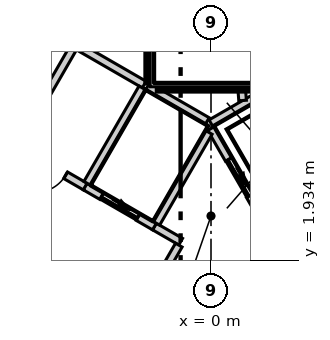
"""IFC4 building model, lengths in metres.
Left out: names, types, materials, properties, quantities, classifications, styles, units other than length and angle.
Written with IfcOpenShell. Run it as: python <this file> out.ifc"""

import sys

from ifc_helpers import new_model, si_unit, direction, frame, frame_2d, origin, place, context, subcontext, project, spatial, polyline, rectangle, outline, extrude, element, fill, save


model = new_model("IFC4")
c1 = context("Model", 3, precision=1e-05, world=origin(), true_north=direction((0.0, 1.0)))
c2 = subcontext(c1, "Body", "Model", "MODEL_VIEW")
j1 = project(units=[si_unit("LENGTHUNIT", "METRE"), si_unit("PLANEANGLEUNIT", "RADIAN")], contexts=[c1])
p1 = place(None, origin())
s1 = spatial("IfcSite", under=j1, at=p1, CompositionType="ELEMENT")
p2 = place(p1, origin())
s2 = spatial("IfcBuilding", under=s1, at=p2, CompositionType="ELEMENT")
p3 = place(p2, frame((0.0, 0.0, 35.3)))
s3 = spatial("IfcBuildingStorey", under=s2, at=p3, CompositionType="ELEMENT", Elevation=35.3)
p4 = place(p3, frame((-1.645, 15.25, -0.3), z_axis=(0.0, 0.0, 1.0), x_axis=(-0.500026485275, -0.866010111964, 0.0)))
e1 = element("IfcWall", 1, at=p4, inside=s3, PredefinedType="SHEAR", context=c2, shape_type="SweptSolid", body=[
    extrude(outline(polyline([(-0.26, -0.45), (1.685, -0.45), (3.63, -0.45), (5.576, -0.45), (7.521, -0.45), (9.466, -0.449), (11.411, -0.449), (13.357, -0.449), (15.302, -0.449), (17.247, -0.449), (19.192, -0.449), (21.138, -0.449), (23.083, -0.449), (25.028, -0.449), (24.509, 0.45), (22.644, 0.45), (20.778, 0.45), (18.913, 0.45), (17.048, 0.45), (15.182, 0.449), (13.317, 0.449), (11.452, 0.449), (9.587, 0.449), (7.721, 0.449), (5.856, 0.449), (3.991, 0.449), (2.125, 0.449), (0.26, 0.449), (-0.26, -0.45)])), origin(), (0.0, 0.0, 1.0), 4.0),
])
p5 = place(p4, frame((11.834, 0.0, 0.3)))
e2 = element("IfcOpeningElement", 2, at=p5, cuts=e1, PredefinedType="OPENING", context=c2, shape_type="SweptSolid", body=[
    extrude(rectangle(XDim=1.1, YDim=2.1, at=frame_2d((0.55, 1.05))), frame((0.0, 0.46, 0.0), z_axis=(0.0, -1.0, 0.0), x_axis=(1.0, 0.0, 0.0)), (0.0, 0.0, 1.0), 0.92),
])
p6 = place(p4, frame((4.842, 0.0, 0.3)))
e3 = element("IfcOpeningElement", 3, at=p6, cuts=e1, PredefinedType="OPENING", context=c2, shape_type="SweptSolid", body=[
    extrude(rectangle(XDim=1.0, YDim=2.1, at=frame_2d((0.5, 1.05))), frame((0.0, 0.46, 0.0), z_axis=(0.0, -1.0, 0.0), x_axis=(1.0, 0.0, 0.0)), (0.0, 0.0, 1.0), 0.92),
])
p7 = place(p3, frame((-3.462, 38.603, 0.0), z_axis=(0.0, 0.0, 1.0), x_axis=(-0.500012207976, -0.866018355391, 0.0)))
e4 = element("IfcWall", 4, at=p7, inside=s3, PredefinedType="ELEMENTEDWALL", context=c2, shape_type="SweptSolid", body=[
    extrude(rectangle(XDim=63.381, YDim=0.2, at=frame_2d((31.69, 0.0))), origin(), (0.0, 0.0, 1.0), 3.7),
])
p8 = place(p7, frame((2.302, 0.0, 0.9)))
e5 = element("IfcOpeningElement", 5, at=p8, cuts=e4, PredefinedType="OPENING", context=c2, shape_type="SweptSolid", body=[
    extrude(rectangle(XDim=5.6, YDim=2.5, at=frame_2d((2.8, 1.25))), frame((0.0, 0.11, 0.0), z_axis=(0.0, -1.0, 0.0), x_axis=(1.0, 0.0, 0.0)), (0.0, 0.0, 1.0), 0.22),
])
p9 = place(p7, frame((9.902, 0.0, 0.9)))
e6 = element("IfcOpeningElement", 6, at=p9, cuts=e4, PredefinedType="OPENING", context=c2, shape_type="SweptSolid", body=[
    extrude(rectangle(XDim=5.6, YDim=2.5, at=frame_2d((2.8, 1.25))), frame((0.0, 0.11, 0.0), z_axis=(0.0, -1.0, 0.0), x_axis=(1.0, 0.0, 0.0)), (0.0, 0.0, 1.0), 0.22),
])
p10 = place(p7, frame((17.501, 0.0, 0.9)))
e7 = element("IfcOpeningElement", 7, at=p10, cuts=e4, PredefinedType="OPENING", context=c2, shape_type="SweptSolid", body=[
    extrude(rectangle(XDim=5.6, YDim=2.5, at=frame_2d((2.8, 1.25))), frame((0.0, 0.11, 0.0), z_axis=(0.0, -1.0, 0.0), x_axis=(1.0, 0.0, 0.0)), (0.0, 0.0, 1.0), 0.22),
])
p11 = place(p7, frame((25.1, 0.0, 0.9)))
e8 = element("IfcOpeningElement", 8, at=p11, cuts=e4, PredefinedType="OPENING", context=c2, shape_type="SweptSolid", body=[
    extrude(rectangle(XDim=5.6, YDim=2.5, at=frame_2d((2.8, 1.25))), frame((0.0, 0.11, 0.0), z_axis=(0.0, -1.0, 0.0), x_axis=(1.0, 0.0, 0.0)), (0.0, 0.0, 1.0), 0.22),
])
p12 = place(p7, frame((32.7, 0.0, 0.9)))
e9 = element("IfcOpeningElement", 9, at=p12, cuts=e4, PredefinedType="OPENING", context=c2, shape_type="SweptSolid", body=[
    extrude(rectangle(XDim=5.6, YDim=2.5, at=frame_2d((2.8, 1.25))), frame((0.0, 0.11, 0.0), z_axis=(0.0, -1.0, 0.0), x_axis=(1.0, 0.0, 0.0)), (0.0, 0.0, 1.0), 0.22),
])
p13 = place(p7, frame((40.299, 0.0, 0.9)))
e10 = element("IfcOpeningElement", 10, at=p13, cuts=e4, PredefinedType="OPENING", context=c2, shape_type="SweptSolid", body=[
    extrude(rectangle(XDim=5.6, YDim=2.5, at=frame_2d((2.8, 1.25))), frame((0.0, 0.11, 0.0), z_axis=(0.0, -1.0, 0.0), x_axis=(1.0, 0.0, 0.0)), (0.0, 0.0, 1.0), 0.22),
])
p14 = place(p7, frame((47.899, 0.0, 0.9)))
e11 = element("IfcOpeningElement", 11, at=p14, cuts=e4, PredefinedType="OPENING", context=c2, shape_type="SweptSolid", body=[
    extrude(rectangle(XDim=5.6, YDim=2.5, at=frame_2d((2.8, 1.25))), frame((0.0, 0.11, 0.0), z_axis=(0.0, -1.0, 0.0), x_axis=(1.0, 0.0, 0.0)), (0.0, 0.0, 1.0), 0.22),
])
p15 = place(p7, frame((55.498, 0.0, 0.9)))
e12 = element("IfcOpeningElement", 12, at=p15, cuts=e4, PredefinedType="OPENING", context=c2, shape_type="SweptSolid", body=[
    extrude(rectangle(XDim=5.6, YDim=2.5, at=frame_2d((2.8, 1.25))), frame((0.0, 0.11, 0.0), z_axis=(0.0, -1.0, 0.0), x_axis=(1.0, 0.0, 0.0)), (0.0, 0.0, 1.0), 0.22),
])
p16 = place(p3, frame((-19.497, -11.17, 0.0), z_axis=(0.0, 0.0, 1.0), x_axis=(0.499998854553, 0.866026065108, 0.0)))
e13 = element("IfcWall", 13, at=p16, inside=s3, PredefinedType="PARTITIONING", context=c2, shape_type="SweptSolid", body=[
    extrude(rectangle(XDim=38.994, YDim=0.15, at=frame_2d((19.497, 0.0))), origin(), (0.0, 0.0, 1.0), 3.7),
])
p17 = place(p16, frame((36.244, 0.0, 0.0)))
e14 = element("IfcOpeningElement", 14, at=p17, cuts=e13, PredefinedType="OPENING", context=c2, shape_type="SweptSolid", body=[
    extrude(rectangle(XDim=1.1, YDim=2.1, at=frame_2d((0.55, 1.05))), frame((0.0, 0.085, 0.0), z_axis=(0.0, -1.0, 0.0), x_axis=(1.0, 0.0, 0.0)), (0.0, 0.0, 1.0), 0.17),
])
p18 = place(p16, frame((29.171, 0.0, 0.0)))
e15 = element("IfcOpeningElement", 15, at=p18, cuts=e13, PredefinedType="OPENING", context=c2, shape_type="SweptSolid", body=[
    extrude(rectangle(XDim=1.0, YDim=2.1, at=frame_2d((0.5, 1.05))), frame((0.0, 0.085, 0.0), z_axis=(0.0, -1.0, 0.0), x_axis=(1.0, 0.0, 0.0)), (0.0, 0.0, 1.0), 0.17),
])
p19 = place(p16, frame((32.971, 0.0, 0.0)))
e16 = element("IfcOpeningElement", 16, at=p19, cuts=e13, PredefinedType="OPENING", context=c2, shape_type="SweptSolid", body=[
    extrude(rectangle(XDim=0.9, YDim=2.1, at=frame_2d((0.45, 1.05))), frame((0.0, 0.085, 0.0), z_axis=(0.0, -1.0, 0.0), x_axis=(1.0, 0.0, 0.0)), (0.0, 0.0, 1.0), 0.17),
])
p20 = place(p16, frame((22.771, 0.0, 0.0)))
e17 = element("IfcOpeningElement", 17, at=p20, cuts=e13, PredefinedType="OPENING", context=c2, shape_type="SweptSolid", body=[
    extrude(rectangle(XDim=1.0, YDim=2.1, at=frame_2d((0.5, 1.05))), frame((0.0, 0.085, 0.0), z_axis=(0.0, -1.0, 0.0), x_axis=(1.0, 0.0, 0.0)), (0.0, 0.0, 1.0), 0.17),
])
p21 = place(p16, frame((6.872, 0.0, 0.0)))
e18 = element("IfcOpeningElement", 18, at=p21, cuts=e13, PredefinedType="OPENING", context=c2, shape_type="SweptSolid", body=[
    extrude(rectangle(XDim=1.1, YDim=2.1, at=frame_2d((0.55, 1.05))), frame((0.0, 0.085, 0.0), z_axis=(0.0, -1.0, 0.0), x_axis=(1.0, 0.0, 0.0)), (0.0, 0.0, 1.0), 0.17),
])
p22 = place(p16, frame((17.372, 0.0, 0.0)))
e19 = element("IfcOpeningElement", 19, at=p22, cuts=e13, PredefinedType="OPENING", context=c2, shape_type="SweptSolid", body=[
    extrude(rectangle(XDim=0.9, YDim=2.1, at=frame_2d((0.45, 1.05))), frame((0.0, 0.085, 0.0), z_axis=(0.0, -1.0, 0.0), x_axis=(1.0, 0.0, 0.0)), (0.0, 0.0, 1.0), 0.17),
])
p23 = place(p16, frame((14.172, 0.0, 0.0)))
e20 = element("IfcOpeningElement", 20, at=p23, cuts=e13, PredefinedType="OPENING", context=c2, shape_type="SweptSolid", body=[
    extrude(rectangle(XDim=0.9, YDim=2.1, at=frame_2d((0.45, 1.05))), frame((0.0, 0.085, 0.0), z_axis=(0.0, -1.0, 0.0), x_axis=(1.0, 0.0, 0.0)), (0.0, 0.0, 1.0), 0.17),
])
p24 = place(p16, frame((11.272, 0.0, 0.0)))
e21 = element("IfcOpeningElement", 21, at=p24, cuts=e13, PredefinedType="OPENING", context=c2, shape_type="SweptSolid", body=[
    extrude(rectangle(XDim=1.0, YDim=2.1, at=frame_2d((0.5, 1.05))), frame((0.0, 0.085, 0.0), z_axis=(0.0, -1.0, 0.0), x_axis=(1.0, 0.0, 0.0)), (0.0, 0.0, 1.0), 0.17),
])
p25 = place(p16, frame((1.473, 0.0, 0.0)))
e22 = element("IfcOpeningElement", 22, at=p25, cuts=e13, PredefinedType="OPENING", context=c2, shape_type="SweptSolid", body=[
    extrude(rectangle(XDim=1.1, YDim=2.1, at=frame_2d((0.55, 1.05))), frame((0.0, 0.085, 0.0), z_axis=(0.0, -1.0, 0.0), x_axis=(1.0, 0.0, 0.0)), (0.0, 0.0, 1.0), 0.17),
])
p26 = place(p3, frame((0.075, 22.47, 0.0), z_axis=(0.0, 0.0, 1.0), x_axis=(0.500002280369, -0.866024087209, 0.0)))
e23 = element("IfcWall", 23, at=p26, inside=s3, PredefinedType="PARTITIONING", context=c2, shape_type="SweptSolid", body=[
    extrude(rectangle(XDim=38.844, YDim=0.15, at=frame_2d((19.422, 0.0))), origin(), (0.0, 0.0, 1.0), 3.7),
])
p27 = place(p26, frame((36.244, 0.0, 0.0)))
e24 = element("IfcOpeningElement", 24, at=p27, cuts=e23, PredefinedType="OPENING", context=c2, shape_type="SweptSolid", body=[
    extrude(rectangle(XDim=1.1, YDim=2.1, at=frame_2d((0.55, 1.05))), frame((0.0, 0.085, 0.0), z_axis=(0.0, -1.0, 0.0), x_axis=(1.0, 0.0, 0.0)), (0.0, 0.0, 1.0), 0.17),
])
p28 = place(p26, frame((26.472, 0.0, 0.0)))
e25 = element("IfcOpeningElement", 25, at=p28, cuts=e23, PredefinedType="OPENING", context=c2, shape_type="SweptSolid", body=[
    extrude(rectangle(XDim=1.1, YDim=2.1, at=frame_2d((0.55, 1.05))), frame((0.0, 0.085, 0.0), z_axis=(0.0, -1.0, 0.0), x_axis=(1.0, 0.0, 0.0)), (0.0, 0.0, 1.0), 0.17),
])
p29 = place(p26, frame((8.872, 0.0, 0.0)))
e26 = element("IfcOpeningElement", 26, at=p29, cuts=e23, PredefinedType="OPENING", context=c2, shape_type="SweptSolid", body=[
    extrude(rectangle(XDim=1.1, YDim=2.1, at=frame_2d((0.55, 1.05))), frame((0.0, 0.085, 0.0), z_axis=(0.0, -1.0, 0.0), x_axis=(1.0, 0.0, 0.0)), (0.0, 0.0, 1.0), 0.17),
])
p30 = place(p26, frame((17.672, 0.0, 0.0)))
e27 = element("IfcOpeningElement", 27, at=p30, cuts=e23, PredefinedType="OPENING", context=c2, shape_type="SweptSolid", body=[
    extrude(rectangle(XDim=0.9, YDim=2.1, at=frame_2d((0.45, 1.05))), frame((0.0, 0.085, 0.0), z_axis=(0.0, -1.0, 0.0), x_axis=(1.0, 0.0, 0.0)), (0.0, 0.0, 1.0), 0.17),
])
p31 = place(p26, frame((15.272, 0.0, 0.0)))
e28 = element("IfcOpeningElement", 28, at=p31, cuts=e23, PredefinedType="OPENING", context=c2, shape_type="SweptSolid", body=[
    extrude(rectangle(XDim=0.9, YDim=2.1, at=frame_2d((0.45, 1.05))), frame((0.0, 0.085, 0.0), z_axis=(0.0, -1.0, 0.0), x_axis=(1.0, 0.0, 0.0)), (0.0, 0.0, 1.0), 0.17),
])
p32 = place(p26, frame((1.473, 0.0, 0.0)))
e29 = element("IfcOpeningElement", 29, at=p32, cuts=e23, PredefinedType="OPENING", context=c2, shape_type="SweptSolid", body=[
    extrude(rectangle(XDim=1.1, YDim=2.1, at=frame_2d((0.55, 1.05))), frame((0.0, 0.085, 0.0), z_axis=(0.0, -1.0, 0.0), x_axis=(1.0, 0.0, 0.0)), (0.0, 0.0, 1.0), 0.17),
])
p33 = place(p3, frame((-0.002, 5.541, 0.0), z_axis=(0.0, 0.0, 1.0), x_axis=(0.86600155993, 0.500041296494, 0.0)))
e30 = element("IfcWall", 30, at=p33, inside=s3, PredefinedType="SOLIDWALL", context=c2, shape_type="SweptSolid", body=[
    extrude(rectangle(XDim=4.132, YDim=0.2, at=frame_2d((2.066, 0.0))), origin(), (0.0, 0.0, 1.0), 3.7),
])
p34 = place(p3, frame((0.0, 5.4, 0.0), z_axis=(0.0, 0.0, 1.0), x_axis=(0.500103862429, -0.865965430478, 0.0)))
e31 = element("IfcWall", 31, at=p34, inside=s3, PredefinedType="SOLIDWALL", context=c2, shape_type="SweptSolid", body=[
    extrude(rectangle(XDim=2.973, YDim=0.2, at=frame_2d((1.487, 0.0))), origin(), (0.0, 0.0, 1.0), 3.7),
])
p35 = place(p34, frame((0.937, 0.0, 0.0)))
e32 = element("IfcOpeningElement", 32, at=p35, cuts=e31, PredefinedType="OPENING", context=c2, shape_type="SweptSolid", body=[
    extrude(rectangle(XDim=1.1, YDim=2.1, at=frame_2d((0.55, 1.05))), frame((0.0, 0.11, 0.0), z_axis=(0.0, -1.0, 0.0), x_axis=(1.0, 0.0, 0.0)), (0.0, 0.0, 1.0), 0.22),
])
p36 = place(p3, frame((-6.97, 5.987, 0.0), z_axis=(0.0, 0.0, 1.0), x_axis=(0.866029956157, -0.499992114976, 0.0)))
e33 = element("IfcWall", 33, at=p36, inside=s3, PredefinedType="SOLIDWALL", context=c2, shape_type="SweptSolid", body=[
    extrude(rectangle(XDim=4.232, YDim=0.2, at=frame_2d((2.116, 0.0))), origin(), (0.0, 0.0, 1.0), 3.7),
])
p37 = place(p36, frame((2.73, 0.0, 0.0)))
e34 = element("IfcOpeningElement", 34, at=p37, cuts=e33, PredefinedType="OPENING", context=c2, shape_type="SweptSolid", body=[
    extrude(rectangle(XDim=0.9, YDim=2.1, at=frame_2d((0.45, 1.05))), frame((0.0, 0.11, 0.0), z_axis=(0.0, -1.0, 0.0), x_axis=(1.0, 0.0, 0.0)), (0.0, 0.0, 1.0), 0.22),
])
p38 = place(p3, frame((-1.488, 2.822, 0.0), z_axis=(0.0, 0.0, 1.0), x_axis=(0.866236612152, -0.499633997809, 0.0)))
e35 = element("IfcWall", 35, at=p38, inside=s3, PredefinedType="SOLIDWALL", context=c2, shape_type="SweptSolid", body=[
    extrude(rectangle(XDim=0.796, YDim=0.2, at=frame_2d((0.398, 0.0))), origin(), (0.0, 0.0, 1.0), 3.7),
])
p39 = place(p3, frame((-5.076, 5.009, 0.0), z_axis=(0.0, 0.0, 1.0), x_axis=(0.50002537861, 0.866010750942, 0.0)))
e36 = element("IfcWall", 36, at=p39, inside=s3, PredefinedType="SOLIDWALL", context=c2, shape_type="SweptSolid", body=[
    extrude(rectangle(XDim=3.0, YDim=0.2, at=frame_2d((1.5, 0.0))), origin(), (0.0, 0.0, 1.0), 3.7),
])
p40 = place(p3, frame((-3.489, 7.557, 0.0), z_axis=(0.0, 0.0, 1.0), x_axis=(0.866010750942, -0.50002537861, 0.0)))
e37 = element("IfcWall", 37, at=p40, inside=s3, PredefinedType="SOLIDWALL", context=c2, shape_type="SweptSolid", body=[
    extrude(rectangle(XDim=2.0, YDim=0.2, at=frame_2d((1.0, 0.0))), origin(), (0.0, 0.0, 1.0), 3.7),
])
p41 = place(p3, frame((-2.444, -0.433, 0.0), z_axis=(0.0, 0.0, 1.0), x_axis=(0.500035624827, 0.866004834804, 0.0)))
e38 = element("IfcWall", 38, at=p41, inside=s3, PredefinedType="SOLIDWALL", context=c2, shape_type="SweptSolid", body=[
    extrude(rectangle(XDim=3.194, YDim=0.2, at=frame_2d((1.597, 0.0))), origin(), (0.0, 0.0, 1.0), 3.7),
])
p42 = place(p3, frame((-3.309, 3.873, 0.0), z_axis=(0.0, 0.0, 1.0), x_axis=(0.866098583652, -0.499873227325, 0.0)))
e39 = element("IfcWall", 39, at=p42, inside=s3, PredefinedType="SOLIDWALL", context=c2, shape_type="SweptSolid", body=[
    extrude(rectangle(XDim=2.103, YDim=0.2, at=frame_2d((1.051, 0.0))), origin(), (0.0, 0.0, 1.0), 3.7),
])
p43 = place(p42, frame((0.502, 0.0, 0.0)))
e40 = element("IfcOpeningElement", 40, at=p43, cuts=e39, PredefinedType="OPENING", context=c2, shape_type="SweptSolid", body=[
    extrude(rectangle(XDim=1.1, YDim=2.1, at=frame_2d((0.55, 1.05))), frame((0.0, 0.11, 0.0), z_axis=(0.0, -1.0, 0.0), x_axis=(1.0, 0.0, 0.0)), (0.0, 0.0, 1.0), 0.22),
])
p44 = place(p3, frame((-3.257, 3.959, 0.0), z_axis=(0.0, 0.0, 1.0), x_axis=(0.50012328804, 0.865954211699, 0.0)))
e41 = element("IfcWall", 41, at=p44, inside=s3, PredefinedType="SOLIDWALL", context=c2, shape_type="SweptSolid", body=[
    extrude(rectangle(XDim=2.9, YDim=0.2, at=frame_2d((1.45, 0.0))), origin(), (0.0, 0.0, 1.0), 3.7),
])
p45 = place(p3, frame((-1.67, 6.507, 0.0), z_axis=(0.0, 0.0, 1.0), x_axis=(0.865941441609, -0.500145398563, 0.0)))
e42 = element("IfcWall", 42, at=p45, inside=s3, PredefinedType="SOLIDWALL", context=c2, shape_type="SweptSolid", body=[
    extrude(rectangle(XDim=1.815, YDim=0.2, at=frame_2d((0.908, 0.0))), origin(), (0.0, 0.0, 1.0), 3.7),
])
p46 = place(p3, frame((-1.438, 2.909, 0.0), z_axis=(0.0, 0.0, 1.0), x_axis=(0.499829630636, 0.866123744241, 0.0)))
e43 = element("IfcWall", 43, at=p46, inside=s3, PredefinedType="SOLIDWALL", context=c2, shape_type="SweptSolid", body=[
    extrude(rectangle(XDim=2.761, YDim=0.2, at=frame_2d((1.38, 0.0))), origin(), (0.0, 0.0, 1.0), 3.7),
])
p47 = place(p3, frame((0.811, 6.4, 0.0), z_axis=(0.0, 0.0, 1.0), x_axis=(0.076199063602, -0.997092624938, 0.0)))
e44 = element("IfcWall", 44, at=p47, inside=s3, PredefinedType="SOLIDWALL", context=c2, shape_type="SweptSolid", body=[
    extrude(rectangle(XDim=0.263, YDim=0.2, at=frame_2d((0.131, 0.0))), origin(), (0.0, 0.0, 1.0), 3.7),
])
p48 = place(p3, frame((-1.4, 6.5, 0.0), z_axis=(0.0, 0.0, 1.0), x_axis=(1.0, 0.0, 0.0)))
e45 = element("IfcWall", 45, at=p48, inside=s3, PredefinedType="SOLIDWALL", context=c2, shape_type="SweptSolid", body=[
    extrude(rectangle(XDim=2.8, YDim=0.2, at=frame_2d((1.4, 0.0))), origin(), (0.0, 0.0, 1.0), 3.7),
])
p49 = place(p3, frame((-1.6, 6.615, 0.0), z_axis=(0.0, 0.0, 1.0), x_axis=(0.0, 1.0, 0.0)))
e46 = element("IfcWall", 46, at=p49, inside=s3, PredefinedType="SOLIDWALL", context=c2, shape_type="SweptSolid", body=[
    extrude(rectangle(XDim=8.615, YDim=0.2, at=frame_2d((4.308, 0.0))), origin(), (0.0, 0.0, 1.0), 3.7),
])
p50 = place(p35, origin())
e47 = element("IfcDoor", 47, at=p50, inside=s3, OperationType="SLIDING_TO_LEFT", PredefinedType="DOOR", context=c2, shape_type="SweptSolid", body=[
    extrude(rectangle(XDim=1.1, YDim=2.1, at=frame_2d((0.55, 1.05))), frame((0.0, 0.025, 0.0), z_axis=(0.0, -1.0, 0.0), x_axis=(1.0, 0.0, 0.0)), (0.0, 0.0, 1.0), 0.05),
])
fill(e32, e47)
p51 = place(p43, origin())
e48 = element("IfcDoor", 48, at=p51, inside=s3, OperationType="SLIDING_TO_LEFT", PredefinedType="DOOR", context=c2, shape_type="SweptSolid", body=[
    extrude(rectangle(XDim=1.1, YDim=2.1, at=frame_2d((0.55, 1.05))), frame((0.0, 0.025, 0.0), z_axis=(0.0, -1.0, 0.0), x_axis=(1.0, 0.0, 0.0)), (0.0, 0.0, 1.0), 0.05),
])
fill(e40, e48)
p52 = place(p37, origin())
e49 = element("IfcDoor", 49, at=p52, inside=s3, OperationType="SINGLE_SWING_LEFT", PredefinedType="DOOR", context=c2, shape_type="SweptSolid", body=[
    extrude(rectangle(XDim=0.9, YDim=2.1, at=frame_2d((0.45, 1.05))), frame((0.0, 0.025, 0.0), z_axis=(0.0, -1.0, 0.0), x_axis=(1.0, 0.0, 0.0)), (0.0, 0.0, 1.0), 0.05),
])
fill(e34, e49)
save(model, sys.argv[1])
